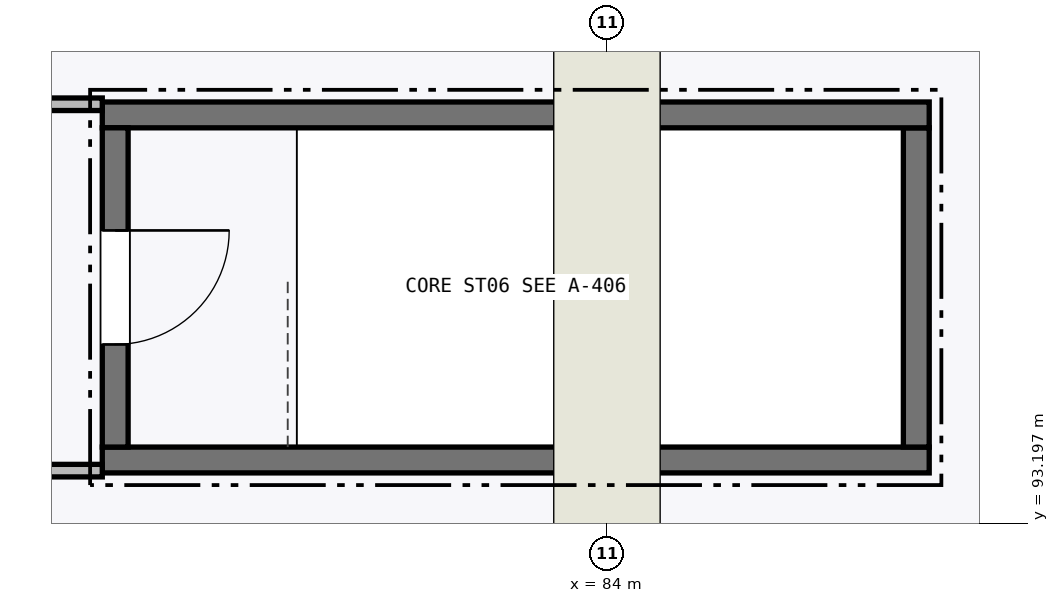
"""IFC4 building model, lengths in metres.
Left out: names, types, materials, properties, quantities, classifications, styles, units other than length and angle.
Written with IfcOpenShell. Run it as: python <this file> out.ifc"""

import sys

from ifc_helpers import new_model, si_unit, direction, frame, frame_2d, origin, place, context, subcontext, project, spatial, rectangle, extrude, element, fill, save


model = new_model("IFC4")
c1 = context("Model", 3, precision=1e-05, world=origin(), true_north=direction((0.0, 1.0)))
c2 = subcontext(c1, "Body", "Model", "MODEL_VIEW")
j1 = project(units=[si_unit("LENGTHUNIT", "METRE"), si_unit("PLANEANGLEUNIT", "RADIAN")], contexts=[c1])
p1 = place(None, origin())
s1 = spatial("IfcSite", under=j1, at=p1, CompositionType="ELEMENT")
p2 = place(p1, origin())
s2 = spatial("IfcBuilding", under=s1, at=p2, CompositionType="ELEMENT")
p3 = place(p2, frame((0.0, 0.0, 16.5)))
s3 = spatial("IfcBuildingStorey", under=s2, at=p3, CompositionType="ELEMENT", Elevation=16.5)
p4 = place(p3, frame((77.36, 94.03, 0.0), z_axis=(0.0, 0.0, 1.0), x_axis=(1.0, 0.0, 0.0)))
e1 = element("IfcWall", 1, at=p4, inside=s3, PredefinedType="SHEAR", context=c2, shape_type="SweptSolid", body=[
    extrude(rectangle(XDim=10.88, YDim=0.34, at=frame_2d((5.44, 0.0))), origin(), (0.0, 0.0, 1.0), 4.845),
])
p5 = place(p3, frame((88.07, 94.2, 0.0), z_axis=(0.0, 0.0, 1.0), x_axis=(0.0, 1.0, 0.0)))
e2 = element("IfcWall", 2, at=p5, inside=s3, PredefinedType="SHEAR", context=c2, shape_type="SweptSolid", body=[
    extrude(rectangle(XDim=4.2, YDim=0.34, at=frame_2d((2.1, 0.0))), origin(), (0.0, 0.0, 1.0), 4.845),
])
p6 = place(p3, frame((88.24, 98.57, 0.0), z_axis=(0.0, 0.0, 1.0), x_axis=(-1.0, 0.0, 0.0)))
e3 = element("IfcWall", 3, at=p6, inside=s3, PredefinedType="SHEAR", context=c2, shape_type="SweptSolid", body=[
    extrude(rectangle(XDim=10.88, YDim=0.34, at=frame_2d((5.44, 0.0))), origin(), (0.0, 0.0, 1.0), 4.845),
])
p7 = place(p3, frame((77.53, 98.4, 0.0), z_axis=(0.0, 0.0, 1.0), x_axis=(0.0, -1.0, 0.0)))
e4 = element("IfcWall", 4, at=p7, inside=s3, PredefinedType="SHEAR", context=c2, shape_type="SweptSolid", body=[
    extrude(rectangle(XDim=4.2, YDim=0.34, at=frame_2d((2.1, 0.0))), origin(), (0.0, 0.0, 1.0), 4.845),
])
p8 = place(p7, frame((1.35, 0.0, 0.0)))
e5 = element("IfcOpeningElement", 5, at=p8, cuts=e4, PredefinedType="OPENING", context=c2, shape_type="SweptSolid", body=[
    extrude(rectangle(XDim=1.5, YDim=2.15, at=frame_2d((0.75, 1.075))), frame((0.0, 0.18, 0.0), z_axis=(0.0, -1.0, 0.0), x_axis=(1.0, 0.0, 0.0)), (0.0, 0.0, 1.0), 0.36),
])
p9 = place(p3, frame((74.5, 98.71, 0.0), z_axis=(0.0, 0.0, 1.0), x_axis=(1.0, 0.0, 0.0)))
e6 = element("IfcWall", 6, at=p9, inside=s3, PredefinedType="PARTITIONING", context=c2, shape_type="SweptSolid", body=[
    extrude(rectangle(XDim=2.86, YDim=0.165, at=frame_2d((1.43, 0.0))), origin(), (0.0, 0.0, 1.0), 4.845),
])
p10 = place(p3, frame((77.36, 93.89, 0.0), z_axis=(0.0, 0.0, 1.0), x_axis=(-1.0, 0.0, 0.0)))
e7 = element("IfcWall", 7, at=p10, inside=s3, PredefinedType="PARTITIONING", context=c2, shape_type="SweptSolid", body=[
    extrude(rectangle(XDim=2.073, YDim=0.165, at=frame_2d((1.036, 0.0))), origin(), (0.0, 0.0, 1.0), 4.32),
])
p11 = place(p8, origin())
e8 = element("IfcDoor", 8, at=p11, inside=s3, OperationType="SINGLE_SWING_LEFT", PredefinedType="DOOR", context=c2, shape_type="SweptSolid", body=[
    extrude(rectangle(XDim=1.5, YDim=2.15, at=frame_2d((0.75, 1.075))), frame((0.0, 0.025, 0.0), z_axis=(0.0, -1.0, 0.0), x_axis=(1.0, 0.0, 0.0)), (0.0, 0.0, 1.0), 0.05),
])
fill(e5, e8)
save(model, sys.argv[1])
